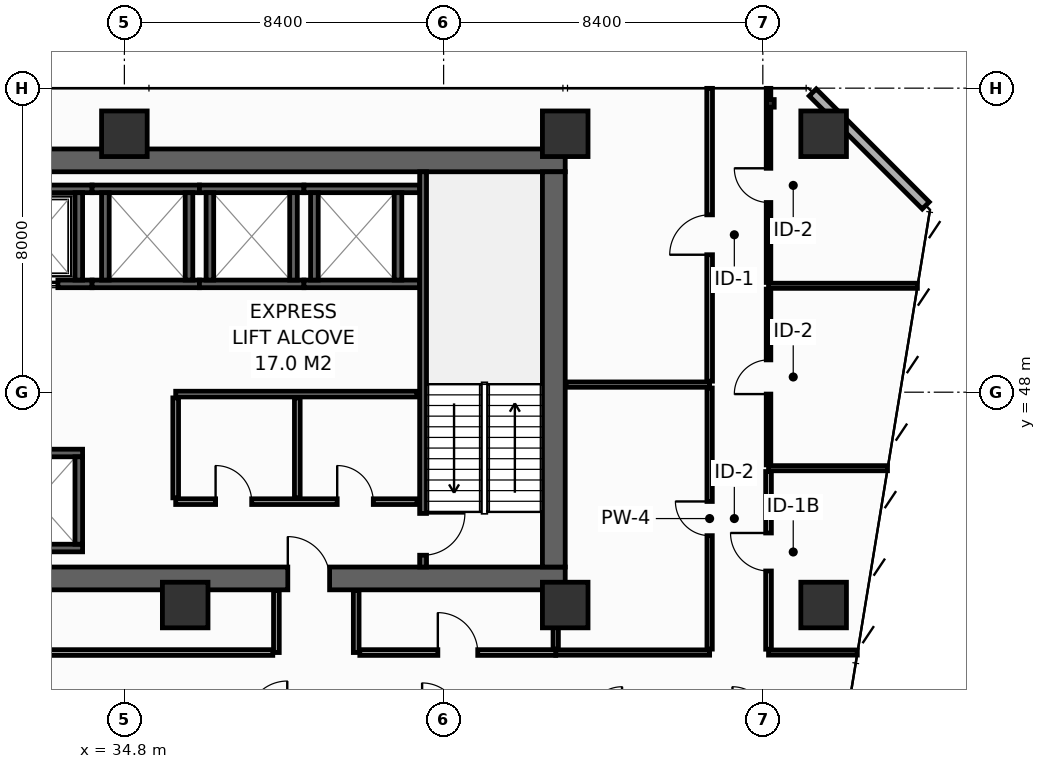
"""IFC4 building model, lengths in metres.
Left out: names, types, materials, properties, quantities, classifications, styles, units other than length and angle.
Written with IfcOpenShell. Run it as: python <this file> out.ifc"""

import sys

from ifc_helpers import new_model, si_unit, direction, frame, frame_2d, origin, origin_2d, place, context, subcontext, project, spatial, rectangle, hollow_rectangle, extrude, element, fill, save


model = new_model("IFC4")
c1 = context("Model", 3, precision=1e-05, world=origin(), true_north=direction((0.0, 1.0)))
c2 = subcontext(c1, "Body", "Model", "MODEL_VIEW")
j1 = project(units=[si_unit("LENGTHUNIT", "METRE"), si_unit("PLANEANGLEUNIT", "RADIAN")], contexts=[c1])
p1 = place(None, origin())
s1 = spatial("IfcSite", under=j1, at=p1, CompositionType="ELEMENT")
p2 = place(p1, origin())
s2 = spatial("IfcBuilding", under=s1, at=p2, CompositionType="ELEMENT")
p3 = place(p2, frame((0.0, 0.0, 60.4)))
s3 = spatial("IfcBuildingStorey", under=s2, at=p3, CompositionType="ELEMENT", Elevation=60.4)
p4 = place(p3, frame((13.5, 43.1, 0.0), z_axis=(0.0, 0.0, 1.0), x_axis=(1.0, 0.0, 0.0)))
e1 = element("IfcWall", 1, at=p4, inside=s3, PredefinedType="SHEAR", context=c2, shape_type="SweptSolid", body=[
    extrude(rectangle(XDim=32.9, YDim=0.6, at=frame_2d((16.45, 0.0))), origin(), (0.0, 0.0, 1.0), 4.15),
])
p5 = place(p4, frame((5.4, 0.0, 0.0)))
e2 = element("IfcOpeningElement", 2, at=p5, cuts=e1, PredefinedType="OPENING", context=c2, shape_type="SweptSolid", body=[
    extrude(rectangle(XDim=1.1, YDim=2.15, at=frame_2d((0.55, 1.075))), frame((0.0, 0.31, 0.0), z_axis=(0.0, -1.0, 0.0), x_axis=(1.0, 0.0, 0.0)), (0.0, 0.0, 1.0), 0.62),
])
p6 = place(p4, frame((25.6, 0.0, 0.0)))
e3 = element("IfcOpeningElement", 3, at=p6, cuts=e1, PredefinedType="OPENING", context=c2, shape_type="SweptSolid", body=[
    extrude(rectangle(XDim=1.1, YDim=2.15, at=frame_2d((0.55, 1.075))), frame((0.0, 0.31, 0.0), z_axis=(0.0, -1.0, 0.0), x_axis=(1.0, 0.0, 0.0)), (0.0, 0.0, 1.0), 0.62),
])
p7 = place(p3, frame((13.5, 54.1, 0.0), z_axis=(0.0, 0.0, 1.0), x_axis=(1.0, 0.0, 0.0)))
e4 = element("IfcWall", 4, at=p7, inside=s3, PredefinedType="SHEAR", context=c2, shape_type="SweptSolid", body=[
    extrude(rectangle(XDim=32.9, YDim=0.6, at=frame_2d((16.45, 0.0))), origin(), (0.0, 0.0, 1.0), 4.15),
])
p8 = place(p3, frame((46.1, 43.4, 0.0), z_axis=(0.0, 0.0, 1.0), x_axis=(0.0, 1.0, 0.0)))
e5 = element("IfcWall", 5, at=p8, inside=s3, PredefinedType="SHEAR", context=c2, shape_type="SweptSolid", body=[
    extrude(rectangle(XDim=10.4, YDim=0.6, at=frame_2d((5.2, 0.0))), origin(), (0.0, 0.0, 1.0), 4.15),
])
for number, where, z_axis, x_axis in (
    (6, (34.8, 54.8, 0.0), (0.0, 0.0, 1.0), (1.0, 0.0, 0.0)),
    (7, (46.4, 54.8, 0.0), (0.0, 0.0, 1.0), (1.0, 0.0, 0.0)),
    (8, (53.2, 54.8, 0.0), (0.0, 0.0, 1.0), (1.0, 0.0, 0.0)),
    (9, (36.4, 42.4, 0.0), (0.0, 0.0, 1.0), (1.0, 0.0, 0.0)),
    (10, (46.4, 42.4, 0.0), (0.0, 0.0, 1.0), (1.0, 0.0, 0.0)),
    (11, (53.2, 42.4, 0.0), (0.0, 0.0, 1.0), (1.0, 0.0, 0.0)),
):
    element("IfcColumn", number, at=place(p3, frame(where, z_axis=z_axis, x_axis=x_axis)), inside=s3, PredefinedType="COLUMN", context=c2, shape_type="SweptSolid", body=[
        extrude(hollow_rectangle(XDim=1.2, YDim=1.2, WallThickness=0.055, at=origin_2d()), origin(), (0.0, 0.0, 1.0), 4.4),
    ])
p9 = place(p3, frame((51.8, 55.6, 0.0), z_axis=(0.0, 0.0, 1.0), x_axis=(1.0, 0.0, 0.0)))
e12 = element("IfcColumn", 12, at=p9, inside=s3, PredefinedType="PILASTER", context=c2, shape_type="SweptSolid", body=[
    extrude(hollow_rectangle(XDim=0.2, YDim=0.2, WallThickness=0.01, at=origin_2d()), origin(), (0.0, 0.0, 1.0), 4.4),
])
p10 = place(p3, frame((31.125, 50.85, 0.0), z_axis=(0.0, 0.0, 1.0), x_axis=(1.0, 0.0, 0.0)))
e13 = element("IfcWall", 13, at=p10, inside=s3, PredefinedType="SHEAR", context=c2, shape_type="SweptSolid", body=[
    extrude(rectangle(XDim=2.825, YDim=0.2, at=frame_2d((1.413, 0.0))), origin(), (0.0, 0.0, 1.0), 4.15),
])
p11 = place(p10, frame((0.825, 0.0, 0.0)))
e14 = element("IfcOpeningElement", 14, at=p11, cuts=e13, PredefinedType="OPENING", context=c2, shape_type="SweptSolid", body=[
    extrude(rectangle(XDim=1.1, YDim=2.2, at=frame_2d((0.55, 1.1))), frame((0.0, 0.11, 0.0), z_axis=(0.0, -1.0, 0.0), x_axis=(1.0, 0.0, 0.0)), (0.0, 0.0, 1.0), 0.22),
])
p12 = place(p3, frame((31.125, 53.35, 0.0), z_axis=(0.0, 0.0, 1.0), x_axis=(1.0, 0.0, 0.0)))
e15 = element("IfcWall", 15, at=p12, inside=s3, PredefinedType="SHEAR", context=c2, shape_type="SweptSolid", body=[
    extrude(rectangle(XDim=2.825, YDim=0.2, at=frame_2d((1.413, 0.0))), origin(), (0.0, 0.0, 1.0), 4.15),
])
p13 = place(p3, frame((33.6, 50.95, 0.0), z_axis=(0.0, 0.0, 1.0), x_axis=(0.0, 1.0, 0.0)))
e16 = element("IfcWall", 16, at=p13, inside=s3, PredefinedType="SHEAR", context=c2, shape_type="SweptSolid", body=[
    extrude(rectangle(XDim=2.3, YDim=0.2, at=frame_2d((1.15, 0.0))), origin(), (0.0, 0.0, 1.0), 4.15),
])
for number, where, z_axis, x_axis in (
    (17, (31.125, 43.9, 0.0), (0.0, 0.0, 1.0), (1.0, 0.0, 0.0)),
    (18, (31.125, 46.4, 0.0), (0.0, 0.0, 1.0), (1.0, 0.0, 0.0)),
):
    element("IfcWall", number, at=place(p3, frame(where, z_axis=z_axis, x_axis=x_axis)), inside=s3, PredefinedType="SHEAR", context=c2, shape_type="SweptSolid", body=[
        extrude(rectangle(XDim=2.575, YDim=0.2, at=frame_2d((1.288, 0.0))), origin(), (0.0, 0.0, 1.0), 4.15),
    ])
p14 = place(p3, frame((33.6, 44.0, 0.0), z_axis=(0.0, 0.0, 1.0), x_axis=(0.0, 1.0, 0.0)))
e19 = element("IfcWall", 19, at=p14, inside=s3, PredefinedType="SHEAR", context=c2, shape_type="SweptSolid", body=[
    extrude(rectangle(XDim=2.3, YDim=0.2, at=frame_2d((1.15, 0.0))), origin(), (0.0, 0.0, 1.0), 4.15),
])
for number, where, z_axis, x_axis in (
    (20, (33.95, 50.85, 0.0), (0.0, 0.0, 1.0), (1.0, 0.0, 0.0)),
    (21, (33.95, 53.35, 0.0), (0.0, 0.0, 1.0), (1.0, 0.0, 0.0)),
):
    element("IfcWall", number, at=place(p3, frame(where, z_axis=z_axis, x_axis=x_axis)), inside=s3, PredefinedType="SHEAR", context=c2, shape_type="SweptSolid", body=[
        extrude(rectangle(XDim=2.825, YDim=0.2, at=frame_2d((1.413, 0.0))), origin(), (0.0, 0.0, 1.0), 4.15),
    ])
for number, where, z_axis, x_axis in (
    (22, (34.3, 50.95, 0.0), (0.0, 0.0, 1.0), (0.0, 1.0, 0.0)),
    (23, (36.5, 50.95, 0.0), (0.0, 0.0, 1.0), (0.0, 1.0, 0.0)),
):
    element("IfcWall", number, at=place(p3, frame(where, z_axis=z_axis, x_axis=x_axis)), inside=s3, PredefinedType="SHEAR", context=c2, shape_type="SweptSolid", body=[
        extrude(rectangle(XDim=2.3, YDim=0.2, at=frame_2d((1.15, 0.0))), origin(), (0.0, 0.0, 1.0), 4.15),
    ])
for number, where, z_axis, x_axis in (
    (24, (36.775, 50.85, 0.0), (0.0, 0.0, 1.0), (1.0, 0.0, 0.0)),
    (25, (36.775, 53.35, 0.0), (0.0, 0.0, 1.0), (1.0, 0.0, 0.0)),
):
    element("IfcWall", number, at=place(p3, frame(where, z_axis=z_axis, x_axis=x_axis)), inside=s3, PredefinedType="SHEAR", context=c2, shape_type="SweptSolid", body=[
        extrude(rectangle(XDim=2.75, YDim=0.2, at=frame_2d((1.375, 0.0))), origin(), (0.0, 0.0, 1.0), 4.15),
    ])
for number, where, z_axis, x_axis in (
    (26, (37.05, 50.95, 0.0), (0.0, 0.0, 1.0), (0.0, 1.0, 0.0)),
    (27, (39.25, 50.95, 0.0), (0.0, 0.0, 1.0), (0.0, 1.0, 0.0)),
):
    element("IfcWall", number, at=place(p3, frame(where, z_axis=z_axis, x_axis=x_axis)), inside=s3, PredefinedType="SHEAR", context=c2, shape_type="SweptSolid", body=[
        extrude(rectangle(XDim=2.3, YDim=0.2, at=frame_2d((1.15, 0.0))), origin(), (0.0, 0.0, 1.0), 4.15),
    ])
for number, where, z_axis, x_axis in (
    (28, (39.525, 50.85, 0.0), (0.0, 0.0, 1.0), (1.0, 0.0, 0.0)),
    (29, (39.525, 53.35, 0.0), (0.0, 0.0, 1.0), (1.0, 0.0, 0.0)),
):
    element("IfcWall", number, at=place(p3, frame(where, z_axis=z_axis, x_axis=x_axis)), inside=s3, PredefinedType="SHEAR", context=c2, shape_type="SweptSolid", body=[
        extrude(rectangle(XDim=3.045, YDim=0.2, at=frame_2d((1.522, 0.0))), origin(), (0.0, 0.0, 1.0), 4.15),
    ])
for number, where, z_axis, x_axis in (
    (30, (39.8, 50.95, 0.0), (0.0, 0.0, 1.0), (0.0, 1.0, 0.0)),
    (31, (42.0, 50.95, 0.0), (0.0, 0.0, 1.0), (0.0, 1.0, 0.0)),
):
    element("IfcWall", number, at=place(p3, frame(where, z_axis=z_axis, x_axis=x_axis)), inside=s3, PredefinedType="SHEAR", context=c2, shape_type="SweptSolid", body=[
        extrude(rectangle(XDim=2.3, YDim=0.2, at=frame_2d((1.15, 0.0))), origin(), (0.0, 0.0, 1.0), 4.15),
    ])
p15 = place(p3, frame((42.66, 53.8, 0.0), z_axis=(0.0, 0.0, 1.0), x_axis=(0.0, -1.0, 0.0)))
e32 = element("IfcWall", 32, at=p15, inside=s3, PredefinedType="SHEAR", context=c2, shape_type="SweptSolid", body=[
    extrude(rectangle(XDim=10.4, YDim=0.18, at=frame_2d((5.2, 0.0))), origin(), (0.0, 0.0, 1.0), 4.15),
])
p16 = place(p15, frame((8.99, 0.0, 0.0)))
e33 = element("IfcOpeningElement", 33, at=p16, cuts=e32, PredefinedType="OPENING", context=c2, shape_type="SweptSolid", body=[
    extrude(rectangle(XDim=1.1, YDim=2.15, at=frame_2d((0.55, 1.075))), frame((0.0, 0.1, 0.0), z_axis=(0.0, -1.0, 0.0), x_axis=(1.0, 0.0, 0.0)), (0.0, 0.0, 1.0), 0.2),
])
p17 = place(p3, frame((36.15, 45.12, 0.0), z_axis=(0.0, 0.0, 1.0), x_axis=(1.0, 0.0, 0.0)))
e34 = element("IfcWall", 34, at=p17, inside=s3, PredefinedType="PARTITIONING", context=c2, shape_type="SweptSolid", body=[
    extrude(rectangle(XDim=6.35, YDim=0.15, at=frame_2d((3.175, 0.0))), origin(), (0.0, 0.0, 1.0), 4.15),
])
p18 = place(p17, frame((1.05, 0.0, 0.0)))
e35 = element("IfcOpeningElement", 35, at=p18, cuts=e34, PredefinedType="OPENING", context=c2, shape_type="SweptSolid", body=[
    extrude(rectangle(XDim=0.95, YDim=2.15, at=frame_2d((0.475, 1.075))), frame((0.0, 0.085, 0.0), z_axis=(0.0, -1.0, 0.0), x_axis=(1.0, 0.0, 0.0)), (0.0, 0.0, 1.0), 0.17),
])
p19 = place(p17, frame((4.25, 0.0, 0.0)))
e36 = element("IfcOpeningElement", 36, at=p19, cuts=e34, PredefinedType="OPENING", context=c2, shape_type="SweptSolid", body=[
    extrude(rectangle(XDim=0.95, YDim=2.15, at=frame_2d((0.475, 1.075))), frame((0.0, 0.085, 0.0), z_axis=(0.0, -1.0, 0.0), x_axis=(1.0, 0.0, 0.0)), (0.0, 0.0, 1.0), 0.17),
])
p20 = place(p3, frame((36.15, 47.95, 0.0), z_axis=(0.0, 0.0, 1.0), x_axis=(1.0, 0.0, 0.0)))
e37 = element("IfcWall", 37, at=p20, inside=s3, PredefinedType="PARTITIONING", context=c2, shape_type="SweptSolid", body=[
    extrude(rectangle(XDim=6.35, YDim=0.15, at=frame_2d((3.175, 0.0))), origin(), (0.0, 0.0, 1.0), 4.15),
])
for number, where, z_axis, x_axis in (
    (38, (36.15, 45.22, 0.0), (0.0, 0.0, 1.0), (0.0, 1.0, 0.0)),
    (39, (39.35, 45.22, 0.0), (0.0, 0.0, 1.0), (0.0, 1.0, 0.0)),
):
    element("IfcWall", number, at=place(p3, frame(where, z_axis=z_axis, x_axis=x_axis)), inside=s3, PredefinedType="PARTITIONING", context=c2, shape_type="SweptSolid", body=[
        extrude(rectangle(XDim=2.63, YDim=0.15, at=frame_2d((1.315, 0.0))), origin(), (0.0, 0.0, 1.0), 4.15),
    ])
p21 = place(p3, frame((55.887, 52.913, 0.0), z_axis=(0.0, 0.0, 1.0), x_axis=(-0.707106781187, 0.707106781187, 0.0)))
e40 = element("IfcWall", 40, at=p21, inside=s3, PredefinedType="STANDARD", context=c2, shape_type="SweptSolid", body=[
    extrude(rectangle(XDim=4.206, YDim=0.26, at=frame_2d((2.103, 0.0))), origin(), (0.0, 0.0, 1.0), 4.15),
])
p22 = place(p3, frame((46.15, 41.15, 0.0), z_axis=(0.0, 0.0, 1.0), x_axis=(1.0, 0.0, 0.0)))
e41 = element("IfcWall", 41, at=p22, inside=s3, PredefinedType="PARTITIONING", context=c2, shape_type="SweptSolid", body=[
    extrude(rectangle(XDim=4.05, YDim=0.14, at=frame_2d((2.025, 0.0))), origin(), (0.0, 0.0, 1.0), 4.15),
])
p23 = place(p3, frame((46.15, 41.24, 0.0), z_axis=(0.0, 0.0, 1.0), x_axis=(0.0, 1.0, 0.0)))
e42 = element("IfcWall", 42, at=p23, inside=s3, PredefinedType="PARTITIONING", context=c2, shape_type="SweptSolid", body=[
    extrude(rectangle(XDim=1.54, YDim=0.14, at=frame_2d((0.77, 0.0))), origin(), (0.0, 0.0, 1.0), 4.15),
])
p24 = place(p3, frame((46.42, 48.2, 0.0), z_axis=(0.0, 0.0, 1.0), x_axis=(1.0, 0.0, 0.0)))
e43 = element("IfcWall", 43, at=p24, inside=s3, PredefinedType="PARTITIONING", context=c2, shape_type="SweptSolid", body=[
    extrude(rectangle(XDim=3.78, YDim=0.14, at=frame_2d((1.89, 0.0))), origin(), (0.0, 0.0, 1.0), 4.15),
])
p25 = place(p3, frame((50.2, 41.24, 0.0), z_axis=(0.0, 0.0, 1.0), x_axis=(0.0, 1.0, 0.0)))
e44 = element("IfcWall", 44, at=p25, inside=s3, PredefinedType="PARTITIONING", context=c2, shape_type="SweptSolid", body=[
    extrude(rectangle(XDim=6.87, YDim=0.14, at=frame_2d((3.435, 0.0))), origin(), (0.0, 0.0, 1.0), 3.335),
])
p26 = place(p25, frame((2.985, 0.0, 0.0)))
e45 = element("IfcOpeningElement", 45, at=p26, cuts=e44, PredefinedType="OPENING", context=c2, shape_type="SweptSolid", body=[
    extrude(rectangle(XDim=0.9, YDim=2.1, at=frame_2d((0.45, 1.05))), frame((0.0, 0.08, 0.0), z_axis=(0.0, -1.0, 0.0), x_axis=(1.0, 0.0, 0.0)), (0.0, 0.0, 1.0), 0.16),
])
p27 = place(p3, frame((50.2, 48.29, 0.0), z_axis=(0.0, 0.0, 1.0), x_axis=(0.0, 1.0, 0.0)))
e46 = element("IfcWall", 46, at=p27, inside=s3, PredefinedType="PARTITIONING", context=c2, shape_type="SweptSolid", body=[
    extrude(rectangle(XDim=7.705, YDim=0.15, at=frame_2d((3.853, 0.0))), origin(), (0.0, 0.0, 1.0), 3.435),
])
p28 = place(p27, frame((3.327, 0.0, 0.0)))
e47 = element("IfcOpeningElement", 47, at=p28, cuts=e46, PredefinedType="OPENING", context=c2, shape_type="SweptSolid", body=[
    extrude(rectangle(XDim=1.05, YDim=2.15, at=frame_2d((0.525, 1.075))), frame((0.0, 0.085, 0.0), z_axis=(0.0, -1.0, 0.0), x_axis=(1.0, 0.0, 0.0)), (0.0, 0.0, 1.0), 0.17),
])
p29 = place(p3, frame((51.75, 41.15, 0.0), z_axis=(0.0, 0.0, 1.0), x_axis=(1.0, 0.0, 0.0)))
e48 = element("IfcWall", 48, at=p29, inside=s3, PredefinedType="PARTITIONING", context=c2, shape_type="SweptSolid", body=[
    extrude(rectangle(XDim=2.336, YDim=0.135, at=frame_2d((1.168, 0.0))), origin(), (0.0, 0.0, 1.0), 3.635),
])
p30 = place(p3, frame((51.75, 46.0, 0.0), z_axis=(0.0, 0.0, 1.0), x_axis=(1.0, 0.0, 0.0)))
e49 = element("IfcWall", 49, at=p30, inside=s3, PredefinedType="PARTITIONING", context=c2, shape_type="SweptSolid", body=[
    extrude(rectangle(XDim=3.131, YDim=0.135, at=frame_2d((1.565, 0.0))), origin(), (0.0, 0.0, 1.0), 3.335),
])
p31 = place(p3, frame((51.75, 50.8, 0.0), z_axis=(0.0, 0.0, 1.0), x_axis=(1.0, 0.0, 0.0)))
e50 = element("IfcWall", 50, at=p31, inside=s3, PredefinedType="PARTITIONING", context=c2, shape_type="SweptSolid", body=[
    extrude(rectangle(XDim=3.917, YDim=0.135, at=frame_2d((1.958, 0.0))), origin(), (0.0, 0.0, 1.0), 3.335),
])
p32 = place(p3, frame((51.75, 41.238, 0.0), z_axis=(0.0, 0.0, 1.0), x_axis=(0.0, 1.0, 0.0)))
e51 = element("IfcWall", 51, at=p32, inside=s3, PredefinedType="PARTITIONING", context=c2, shape_type="SweptSolid", body=[
    extrude(rectangle(XDim=4.675, YDim=0.15, at=frame_2d((2.337, 0.0))), origin(), (0.0, 0.0, 1.0), 3.335),
])
p33 = place(p32, frame((2.058, 0.0, 0.0)))
e52 = element("IfcOpeningElement", 52, at=p33, cuts=e51, PredefinedType="OPENING", context=c2, shape_type="SweptSolid", body=[
    extrude(rectangle(XDim=1.0, YDim=2.15, at=frame_2d((0.5, 1.075))), frame((0.0, 0.085, 0.0), z_axis=(0.0, -1.0, 0.0), x_axis=(1.0, 0.0, 0.0)), (0.0, 0.0, 1.0), 0.17),
])
p34 = place(p3, frame((51.75, 46.087, 0.0), z_axis=(0.0, 0.0, 1.0), x_axis=(0.0, 1.0, 0.0)))
e53 = element("IfcWall", 53, at=p34, inside=s3, PredefinedType="PARTITIONING", context=c2, shape_type="SweptSolid", body=[
    extrude(rectangle(XDim=4.625, YDim=0.12, at=frame_2d((2.312, 0.0))), origin(), (0.0, 0.0, 1.0), 4.15),
])
p35 = place(p34, frame((1.863, 0.0, 0.0)))
e54 = element("IfcOpeningElement", 54, at=p35, cuts=e53, PredefinedType="OPENING", context=c2, shape_type="SweptSolid", body=[
    extrude(rectangle(XDim=0.9, YDim=2.1, at=frame_2d((0.45, 1.05))), frame((0.0, 0.07, 0.0), z_axis=(0.0, -1.0, 0.0), x_axis=(1.0, 0.0, 0.0)), (0.0, 0.0, 1.0), 0.14),
])
p36 = place(p3, frame((51.75, 50.887, 0.0), z_axis=(0.0, 0.0, 1.0), x_axis=(0.0, 1.0, 0.0)))
e55 = element("IfcWall", 55, at=p36, inside=s3, PredefinedType="PARTITIONING", context=c2, shape_type="SweptSolid", body=[
    extrude(rectangle(XDim=5.108, YDim=0.12, at=frame_2d((2.554, 0.0))), origin(), (0.0, 0.0, 1.0), 3.435),
])
p37 = place(p36, frame((2.104, 0.0, 0.0)))
e56 = element("IfcOpeningElement", 56, at=p37, cuts=e55, PredefinedType="OPENING", context=c2, shape_type="SweptSolid", body=[
    extrude(rectangle(XDim=0.9, YDim=2.1, at=frame_2d((0.45, 1.05))), frame((0.0, 0.07, 0.0), z_axis=(0.0, -1.0, 0.0), x_axis=(1.0, 0.0, 0.0)), (0.0, 0.0, 1.0), 0.14),
])
for number, where, z_axis, x_axis in (
    (57, (38.8, 41.15, 0.0), (0.0, 0.0, 1.0), (0.0, 1.0, 0.0)),
    (58, (40.9, 41.15, 0.0), (0.0, 0.0, 1.0), (0.0, 1.0, 0.0)),
):
    element("IfcWall", number, at=place(p3, frame(where, z_axis=z_axis, x_axis=x_axis)), inside=s3, PredefinedType="PARTITIONING", context=c2, shape_type="SweptSolid", body=[
        extrude(rectangle(XDim=1.63, YDim=0.15, at=frame_2d((0.815, 0.0))), origin(), (0.0, 0.0, 1.0), 4.15),
    ])
p38 = place(p3, frame((20.795, 41.15, 0.0), z_axis=(0.0, 0.0, 1.0), x_axis=(1.0, 0.0, 0.0)))
e59 = element("IfcWall", 59, at=p38, inside=s3, PredefinedType="PARTITIONING", context=c2, shape_type="SweptSolid", body=[
    extrude(rectangle(XDim=17.91, YDim=0.15, at=frame_2d((8.955, 0.0))), origin(), (0.0, 0.0, 1.0), 3.335),
])
p39 = place(p38, frame((8.43, 0.0, 0.0)))
e60 = element("IfcOpeningElement", 60, at=p39, cuts=e59, PredefinedType="OPENING", context=c2, shape_type="SweptSolid", body=[
    extrude(rectangle(XDim=1.05, YDim=2.15, at=frame_2d((0.525, 1.075))), frame((0.0, 0.085, 0.0), z_axis=(0.0, -1.0, 0.0), x_axis=(1.0, 0.0, 0.0)), (0.0, 0.0, 1.0), 0.17),
])
p40 = place(p3, frame((40.995, 41.15, 0.0), z_axis=(0.0, 0.0, 1.0), x_axis=(1.0, 0.0, 0.0)))
e61 = element("IfcWall", 61, at=p40, inside=s3, PredefinedType="PARTITIONING", context=c2, shape_type="SweptSolid", body=[
    extrude(rectangle(XDim=5.155, YDim=0.15, at=frame_2d((2.577, 0.0))), origin(), (0.0, 0.0, 1.0), 4.15),
])
p41 = place(p40, frame((2.053, 0.0, 0.0)))
e62 = element("IfcOpeningElement", 62, at=p41, cuts=e61, PredefinedType="OPENING", context=c2, shape_type="SweptSolid", body=[
    extrude(rectangle(XDim=1.05, YDim=2.15, at=frame_2d((0.525, 1.075))), frame((0.0, 0.085, 0.0), z_axis=(0.0, -1.0, 0.0), x_axis=(1.0, 0.0, 0.0)), (0.0, 0.0, 1.0), 0.17),
])
p42 = place(p11, origin())
e63 = element("IfcDoor", 63, at=p42, inside=s3, OperationType="SLIDING_TO_LEFT", PredefinedType="DOOR", context=c2, shape_type="SweptSolid", body=[
    extrude(rectangle(XDim=1.1, YDim=2.2, at=frame_2d((0.55, 1.1))), frame((0.0, 0.025, 0.0), z_axis=(0.0, -1.0, 0.0), x_axis=(1.0, 0.0, 0.0)), (0.0, 0.0, 1.0), 0.05),
])
fill(e14, e63)
p43 = place(p16, origin())
e64 = element("IfcDoor", 64, at=p43, inside=s3, OperationType="SINGLE_SWING_LEFT", PredefinedType="DOOR", context=c2, shape_type="SweptSolid", body=[
    extrude(rectangle(XDim=1.1, YDim=2.15, at=frame_2d((0.55, 1.075))), frame((0.0, 0.025, 0.0), z_axis=(0.0, -1.0, 0.0), x_axis=(1.0, 0.0, 0.0)), (0.0, 0.0, 1.0), 0.05),
])
fill(e33, e64)
p44 = place(p6, origin())
e65 = element("IfcDoor", 65, at=p44, inside=s3, OperationType="SINGLE_SWING_LEFT", PredefinedType="DOOR", context=c2, shape_type="SweptSolid", body=[
    extrude(rectangle(XDim=1.1, YDim=2.15, at=frame_2d((0.55, 1.075))), frame((0.0, 0.025, 0.0), z_axis=(0.0, -1.0, 0.0), x_axis=(1.0, 0.0, 0.0)), (0.0, 0.0, 1.0), 0.05),
])
fill(e3, e65)
p45 = place(p18, origin())
e66 = element("IfcDoor", 66, at=p45, inside=s3, OperationType="SINGLE_SWING_LEFT", PredefinedType="DOOR", context=c2, shape_type="SweptSolid", body=[
    extrude(rectangle(XDim=0.95, YDim=2.15, at=frame_2d((0.475, 1.075))), frame((0.0, 0.025, 0.0), z_axis=(0.0, -1.0, 0.0), x_axis=(1.0, 0.0, 0.0)), (0.0, 0.0, 1.0), 0.05),
])
fill(e35, e66)
p46 = place(p19, origin())
e67 = element("IfcDoor", 67, at=p46, inside=s3, OperationType="SINGLE_SWING_LEFT", PredefinedType="DOOR", context=c2, shape_type="SweptSolid", body=[
    extrude(rectangle(XDim=0.95, YDim=2.15, at=frame_2d((0.475, 1.075))), frame((0.0, 0.025, 0.0), z_axis=(0.0, -1.0, 0.0), x_axis=(1.0, 0.0, 0.0)), (0.0, 0.0, 1.0), 0.05),
])
fill(e36, e67)
p47 = place(p26, origin())
e68 = element("IfcDoor", 68, at=p47, inside=s3, OperationType="SINGLE_SWING_RIGHT", PredefinedType="DOOR", context=c2, shape_type="SweptSolid", body=[
    extrude(rectangle(XDim=0.9, YDim=2.1, at=frame_2d((0.45, 1.05))), frame((0.0, 0.025, 0.0), z_axis=(0.0, -1.0, 0.0), x_axis=(1.0, 0.0, 0.0)), (0.0, 0.0, 1.0), 0.05),
])
fill(e45, e68)
p48 = place(p28, origin())
e69 = element("IfcDoor", 69, at=p48, inside=s3, OperationType="SINGLE_SWING_LEFT", PredefinedType="DOOR", context=c2, shape_type="SweptSolid", body=[
    extrude(rectangle(XDim=1.05, YDim=2.15, at=frame_2d((0.525, 1.075))), frame((0.0, 0.025, 0.0), z_axis=(0.0, -1.0, 0.0), x_axis=(1.0, 0.0, 0.0)), (0.0, 0.0, 1.0), 0.05),
])
fill(e47, e69)
p49 = place(p33, origin())
e70 = element("IfcDoor", 70, at=p49, inside=s3, OperationType="SINGLE_SWING_RIGHT", PredefinedType="DOOR", context=c2, shape_type="SweptSolid", body=[
    extrude(rectangle(XDim=1.0, YDim=2.15, at=frame_2d((0.5, 1.075))), frame((0.0, 0.025, 0.0), z_axis=(0.0, -1.0, 0.0), x_axis=(1.0, 0.0, 0.0)), (0.0, 0.0, 1.0), 0.05),
])
fill(e52, e70)
p50 = place(p35, origin())
e71 = element("IfcDoor", 71, at=p50, inside=s3, OperationType="SINGLE_SWING_LEFT", PredefinedType="DOOR", context=c2, shape_type="SweptSolid", body=[
    extrude(rectangle(XDim=0.9, YDim=2.1, at=frame_2d((0.45, 1.05))), frame((0.0, 0.025, 0.0), z_axis=(0.0, -1.0, 0.0), x_axis=(1.0, 0.0, 0.0)), (0.0, 0.0, 1.0), 0.05),
])
fill(e54, e71)
p51 = place(p37, origin())
e72 = element("IfcDoor", 72, at=p51, inside=s3, OperationType="SINGLE_SWING_RIGHT", PredefinedType="DOOR", context=c2, shape_type="SweptSolid", body=[
    extrude(rectangle(XDim=0.9, YDim=2.1, at=frame_2d((0.45, 1.05))), frame((0.0, 0.025, 0.0), z_axis=(0.0, -1.0, 0.0), x_axis=(1.0, 0.0, 0.0)), (0.0, 0.0, 1.0), 0.05),
])
fill(e56, e72)
p52 = place(p41, origin())
e73 = element("IfcDoor", 73, at=p52, inside=s3, OperationType="SINGLE_SWING_LEFT", PredefinedType="DOOR", context=c2, shape_type="SweptSolid", body=[
    extrude(rectangle(XDim=1.05, YDim=2.15, at=frame_2d((0.525, 1.075))), frame((0.0, 0.025, 0.0), z_axis=(0.0, -1.0, 0.0), x_axis=(1.0, 0.0, 0.0)), (0.0, 0.0, 1.0), 0.05),
])
fill(e62, e73)
save(model, sys.argv[1])
